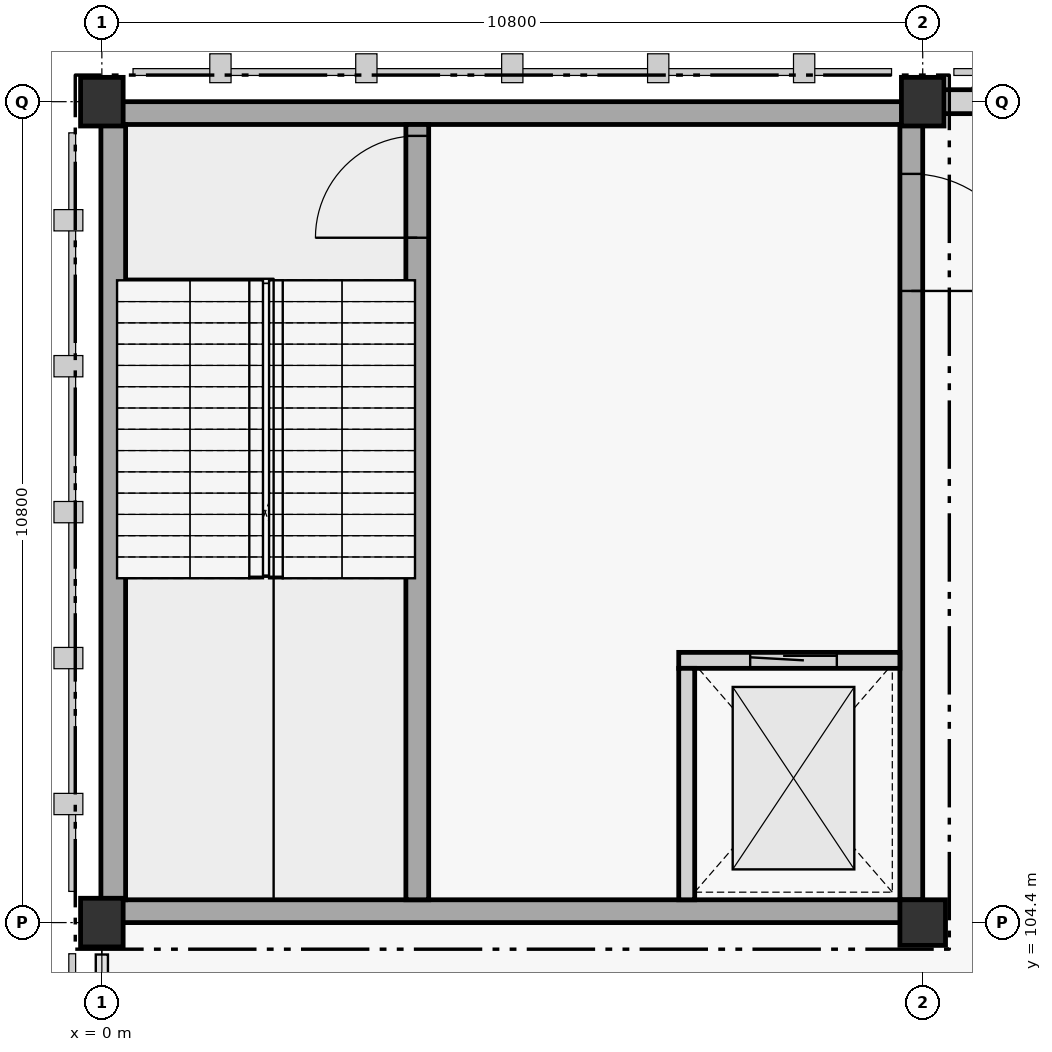
"""IFC4 building model, lengths in metres.
Left out: names, types, materials, properties, quantities, classifications, styles, units other than length and angle.
Written with IfcOpenShell. Run it as: python <this file> out.ifc"""

import sys

from ifc_helpers import new_model, si_unit, direction, frame, frame_2d, origin, origin_2d, place, context, subcontext, project, spatial, rectangle, extrude, element, fill, save


model = new_model("IFC4")
c1 = context("Model", 3, precision=1e-05, world=origin(), true_north=direction((0.0, 1.0)))
c2 = subcontext(c1, "Body", "Model", "MODEL_VIEW")
j1 = project(units=[si_unit("LENGTHUNIT", "METRE"), si_unit("PLANEANGLEUNIT", "RADIAN")], contexts=[c1])
p1 = place(None, origin())
s1 = spatial("IfcSite", under=j1, at=p1, CompositionType="ELEMENT")
p2 = place(p1, origin())
s2 = spatial("IfcBuilding", under=s1, at=p2, CompositionType="ELEMENT")
p3 = place(p2, frame((0.0, 0.0, 5.4)))
s3 = spatial("IfcBuildingStorey", under=s2, at=p3, CompositionType="ELEMENT", Elevation=5.4)
for number, where, z_axis, x_axis in (
    (1, (0.0, 104.4, 0.0), (0.0, 0.0, 1.0), (1.0, 0.0, 0.0)),
    (2, (0.0, 115.2, 0.0), (0.0, 0.0, 1.0), (1.0, 0.0, 0.0)),
):
    element("IfcColumn", number, at=place(p3, frame(where, z_axis=z_axis, x_axis=x_axis)), inside=s3, PredefinedType="COLUMN", context=c2, shape_type="SweptSolid", body=[
        extrude(rectangle(XDim=0.56, YDim=0.64, at=origin_2d()), origin(), (0.0, 0.0, 1.0), 5.4),
    ])
p4 = place(p3, frame((10.8, 104.4, 0.0), z_axis=(0.0, 0.0, 1.0), x_axis=(1.0, 0.0, 0.0)))
e3 = element("IfcColumn", 3, at=p4, inside=s3, PredefinedType="COLUMN", context=c2, shape_type="SweptSolid", body=[
    extrude(rectangle(XDim=0.6, YDim=0.6, at=origin_2d()), origin(), (0.0, 0.0, 1.0), 5.4),
])
p5 = place(p3, frame((10.8, 115.2, 0.0), z_axis=(0.0, 0.0, 1.0), x_axis=(1.0, 0.0, 0.0)))
e4 = element("IfcColumn", 4, at=p5, inside=s3, PredefinedType="COLUMN", context=c2, shape_type="SweptSolid", body=[
    extrude(rectangle(XDim=0.56, YDim=0.64, at=origin_2d()), origin(), (0.0, 0.0, 1.0), 5.4),
])
for number, where, z_axis, x_axis in (
    (5, (10.8, 104.55, 0.0), (0.0, 0.0, 1.0), (-1.0, 0.0, 0.0)),
    (6, (0.0, 115.05, 0.0), (0.0, 0.0, 1.0), (1.0, 0.0, 0.0)),
):
    element("IfcWall", number, at=place(p3, frame(where, z_axis=z_axis, x_axis=x_axis)), inside=s3, PredefinedType="SHEAR", context=c2, shape_type="SweptSolid", body=[
        extrude(rectangle(XDim=10.8, YDim=0.3, at=frame_2d((5.4, 0.0))), origin(), (0.0, 0.0, 1.0), 5.4),
    ])
p6 = place(p3, frame((0.15, 104.7, 0.0), z_axis=(0.0, 0.0, 1.0), x_axis=(0.0, 1.0, 0.0)))
e7 = element("IfcWall", 7, at=p6, inside=s3, PredefinedType="SHEAR", context=c2, shape_type="SweptSolid", body=[
    extrude(rectangle(XDim=10.2, YDim=0.325, at=frame_2d((5.1, 0.0))), origin(), (0.0, 0.0, 1.0), 5.4),
])
p7 = place(p3, frame((10.65, 114.9, 0.0), z_axis=(0.0, 0.0, 1.0), x_axis=(0.0, -1.0, 0.0)))
e8 = element("IfcWall", 8, at=p7, inside=s3, PredefinedType="SHEAR", context=c2, shape_type="SweptSolid", body=[
    extrude(rectangle(XDim=10.2, YDim=0.3, at=frame_2d((5.1, 0.0))), origin(), (0.0, 0.0, 1.0), 5.4),
])
p8 = place(p7, frame((0.65, 0.0, 0.0)))
e9 = element("IfcOpeningElement", 9, at=p8, cuts=e8, PredefinedType="OPENING", context=c2, shape_type="SweptSolid", body=[
    extrude(rectangle(XDim=1.54, YDim=2.22, at=frame_2d((0.77, 1.11))), frame((0.0, 0.15, 0.0), z_axis=(0.0, -1.0, 0.0), x_axis=(1.0, 0.0, 0.0)), (0.0, 0.0, 1.0), 0.3),
])
p9 = place(p3, frame((4.15, 104.7, 0.0), z_axis=(0.0, 0.0, 1.0), x_axis=(0.0, 1.0, 0.0)))
e10 = element("IfcWall", 10, at=p9, inside=s3, PredefinedType="SHEAR", context=c2, shape_type="SweptSolid", body=[
    extrude(rectangle(XDim=10.2, YDim=0.3, at=frame_2d((5.1, 0.0))), origin(), (0.0, 0.0, 1.0), 5.4),
])
p10 = place(p9, frame((8.71, 0.0, 0.0)))
e11 = element("IfcOpeningElement", 11, at=p10, cuts=e10, PredefinedType="OPENING", context=c2, shape_type="SweptSolid", body=[
    extrude(rectangle(XDim=1.34, YDim=2.18, at=frame_2d((0.67, 1.09))), frame((0.0, 0.15, 0.0), z_axis=(0.0, -1.0, 0.0), x_axis=(1.0, 0.0, 0.0)), (0.0, 0.0, 1.0), 0.3),
])
p11 = place(p3, frame((11.076, 115.2, 0.0), z_axis=(0.0, 0.0, 1.0), x_axis=(1.0, 0.0, 0.0)))
e12 = element("IfcWall", 12, at=p11, inside=s3, PredefinedType="STANDARD", context=c2, shape_type="SweptSolid", body=[
    extrude(rectangle(XDim=10.248, YDim=0.315, at=frame_2d((5.124, 0.0))), origin(), (0.0, 0.0, 1.0), 4.425),
])
p12 = place(p11, frame((4.049, 0.0, 0.9)))
e13 = element("IfcOpeningElement", 13, at=p12, cuts=e12, PredefinedType="OPENING", context=c2, shape_type="SweptSolid", body=[
    extrude(rectangle(XDim=2.15, YDim=2.12, at=frame_2d((1.075, 1.06))), frame((0.0, 0.157, 0.0), z_axis=(0.0, -1.0, 0.0), x_axis=(1.0, 0.0, 0.0)), (0.0, 0.0, 1.0), 0.315),
])
p13 = place(p3, frame((7.59, 107.85, 0.0), z_axis=(0.0, 0.0, 1.0), x_axis=(1.0, 0.0, 0.0)))
e14 = element("IfcWall", 14, at=p13, inside=s3, PredefinedType="STANDARD", context=c2, shape_type="SweptSolid", body=[
    extrude(rectangle(XDim=2.91, YDim=0.21, at=frame_2d((1.455, 0.0))), origin(), (0.0, 0.0, 1.0), 5.4),
])
p14 = place(p13, frame((0.94, 0.0, 0.0)))
e15 = element("IfcOpeningElement", 15, at=p14, cuts=e14, PredefinedType="OPENING", context=c2, shape_type="SweptSolid", body=[
    extrude(rectangle(XDim=1.14, YDim=2.16, at=frame_2d((0.57, 1.08))), frame((0.0, 0.105, 0.0), z_axis=(0.0, -1.0, 0.0), x_axis=(1.0, 0.0, 0.0)), (0.0, 0.0, 1.0), 0.21),
])
p15 = place(p3, frame((7.695, 104.7, 0.0), z_axis=(0.0, 0.0, 1.0), x_axis=(0.0, 1.0, 0.0)))
e16 = element("IfcWall", 16, at=p15, inside=s3, PredefinedType="STANDARD", context=c2, shape_type="SweptSolid", body=[
    extrude(rectangle(XDim=3.045, YDim=0.21, at=frame_2d((1.522, 0.0))), origin(), (0.0, 0.0, 1.0), 5.4),
])
p16 = place(p14, origin())
e17 = element("IfcDoor", 17, at=p16, inside=s3, OperationType="SLIDING_TO_LEFT", PredefinedType="DOOR", context=c2, shape_type="SweptSolid", body=[
    extrude(rectangle(XDim=1.14, YDim=2.16, at=frame_2d((0.57, 1.08))), frame((0.0, 0.025, 0.0), z_axis=(0.0, -1.0, 0.0), x_axis=(1.0, 0.0, 0.0)), (0.0, 0.0, 1.0), 0.05),
])
fill(e15, e17)
p17 = place(p10, origin())
e18 = element("IfcDoor", 18, at=p17, inside=s3, OperationType="SINGLE_SWING_LEFT", PredefinedType="DOOR", context=c2, shape_type="SweptSolid", body=[
    extrude(rectangle(XDim=1.34, YDim=2.18, at=frame_2d((0.67, 1.09))), frame((0.0, 0.025, 0.0), z_axis=(0.0, -1.0, 0.0), x_axis=(1.0, 0.0, 0.0)), (0.0, 0.0, 1.0), 0.05),
])
fill(e11, e18)
p18 = place(p8, origin())
e19 = element("IfcDoor", 19, at=p18, inside=s3, OperationType="SINGLE_SWING_RIGHT", PredefinedType="DOOR", context=c2, shape_type="SweptSolid", body=[
    extrude(rectangle(XDim=1.54, YDim=2.22, at=frame_2d((0.77, 1.11))), frame((0.0, 0.025, 0.0), z_axis=(0.0, -1.0, 0.0), x_axis=(1.0, 0.0, 0.0)), (0.0, 0.0, 1.0), 0.05),
])
fill(e9, e19)
save(model, sys.argv[1])
